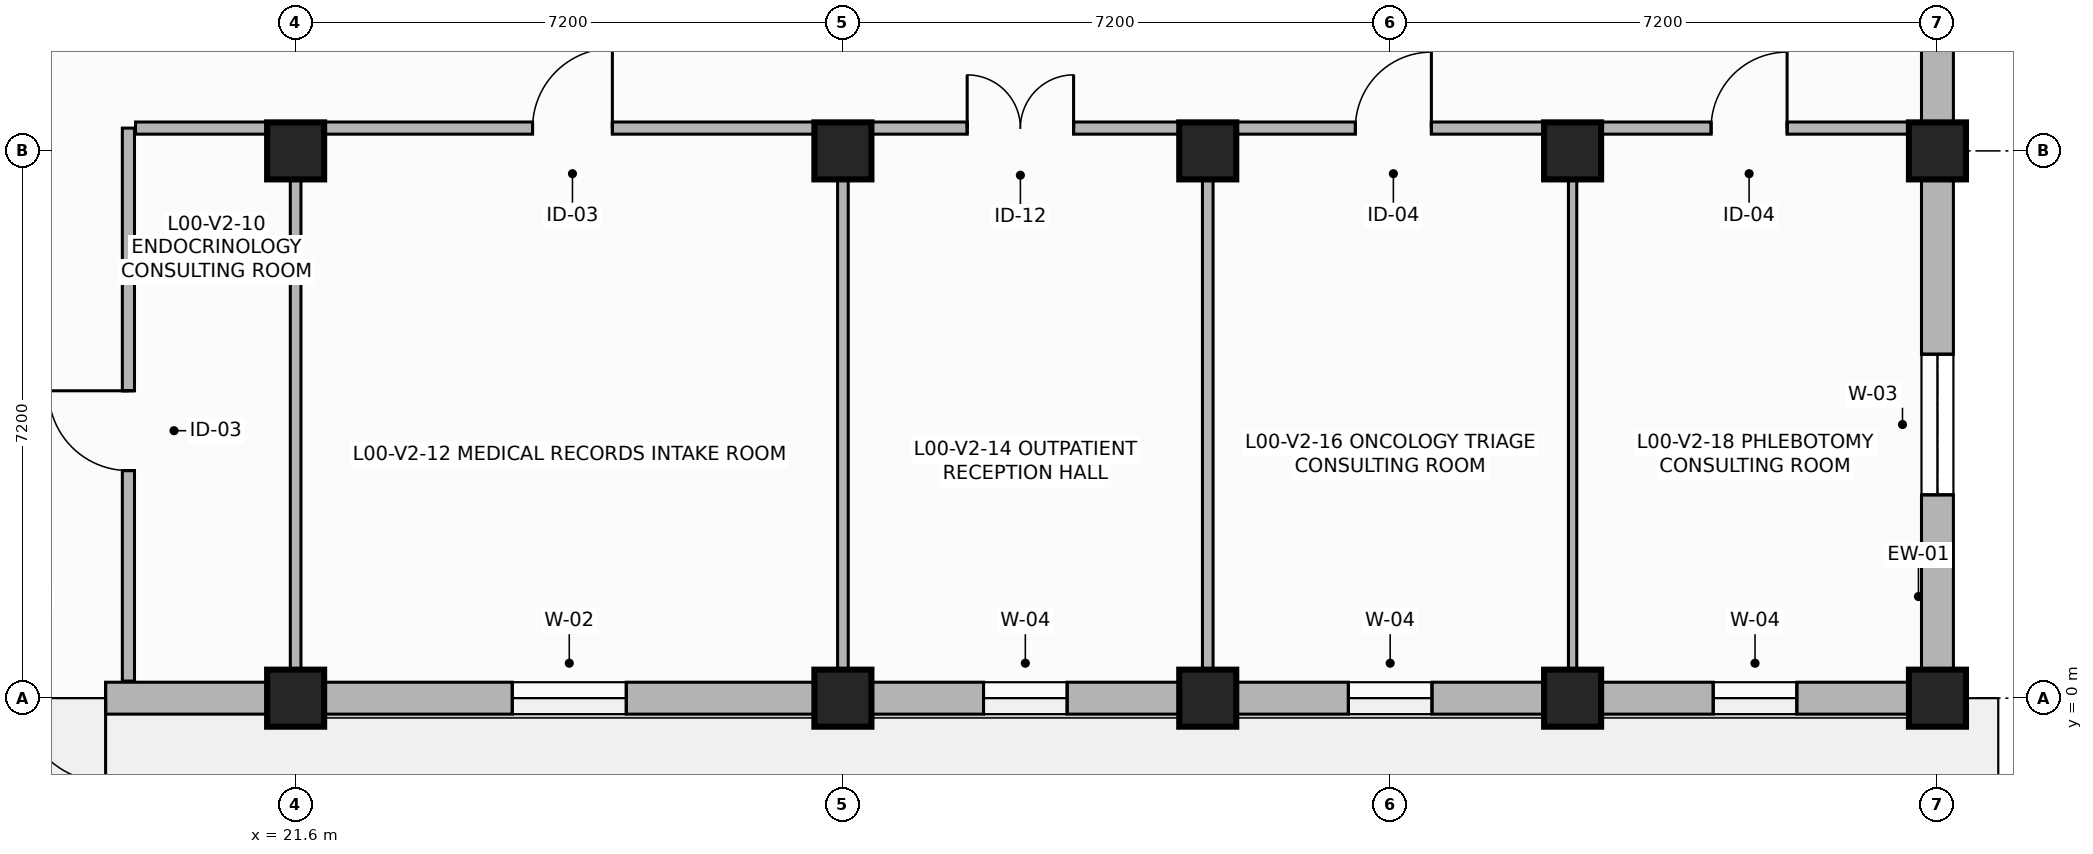
"""IFC4 building model, lengths in metres.
Left out: names, types, materials, properties, quantities, classifications, styles, units other than length and angle.
Written with IfcOpenShell. Run it as: python <this file> out.ifc"""

import sys

from ifc_helpers import new_model, si_unit, direction, frame, frame_2d, origin, origin_2d, place, context, subcontext, project, spatial, rectangle, extrude, element, fill, save


model = new_model("IFC4")
c1 = context("Model", 3, precision=1e-05, world=origin(), true_north=direction((0.0, 1.0)))
c2 = subcontext(c1, "Body", "Model", "MODEL_VIEW")
j1 = project(units=[si_unit("LENGTHUNIT", "METRE"), si_unit("PLANEANGLEUNIT", "RADIAN")], contexts=[c1])
p1 = place(None, origin())
s1 = spatial("IfcSite", under=j1, at=p1, CompositionType="ELEMENT")
p2 = place(p1, origin())
s2 = spatial("IfcBuilding", under=s1, at=p2, CompositionType="ELEMENT")
p3 = place(p2, origin())
s3 = spatial("IfcBuildingStorey", under=s2, at=p3, CompositionType="ELEMENT", Elevation=0.0)
for number, where, z_axis, x_axis in (
    (1, (21.6, 0.0, 0.0), (0.0, 0.0, 1.0), (1.0, 0.0, 0.0)),
    (2, (21.6, 7.2, 0.0), (0.0, 0.0, 1.0), (1.0, 0.0, 0.0)),
    (3, (28.8, 0.0, 0.0), (0.0, 0.0, 1.0), (1.0, 0.0, 0.0)),
    (4, (28.8, 7.2, 0.0), (0.0, 0.0, 1.0), (1.0, 0.0, 0.0)),
    (5, (33.6, 0.0, 0.0), (0.0, 0.0, 1.0), (1.0, 0.0, 0.0)),
    (6, (33.6, 7.2, 0.0), (0.0, 0.0, 1.0), (1.0, 0.0, 0.0)),
    (7, (38.4, 0.0, 0.0), (0.0, 0.0, 1.0), (1.0, 0.0, 0.0)),
    (8, (38.4, 7.2, 0.0), (0.0, 0.0, 1.0), (1.0, 0.0, 0.0)),
    (9, (43.2, 0.0, 0.0), (0.0, 0.0, 1.0), (1.0, 0.0, 0.0)),
    (10, (43.2, 7.2, 0.0), (0.0, 0.0, 1.0), (1.0, 0.0, 0.0)),
):
    element("IfcColumn", number, at=place(p3, frame(where, z_axis=z_axis, x_axis=x_axis)), inside=s3, PredefinedType="COLUMN", context=c2, shape_type="SweptSolid", body=[
        extrude(rectangle(XDim=0.75, YDim=0.75, at=origin_2d()), origin(), (0.0, 0.0, 1.0), 4.22),
    ])
p4 = place(p3, frame((14.4, 0.0, 0.0), z_axis=(0.0, 0.0, 1.0), x_axis=(1.0, 0.0, 0.0)))
e11 = element("IfcWall", 11, at=p4, inside=s3, PredefinedType="SOLIDWALL", context=c2, shape_type="SweptSolid", body=[
    extrude(rectangle(XDim=7.2, YDim=0.42, at=frame_2d((3.6, 0.0))), origin(), (0.0, 0.0, 1.0), 3.6),
])
p5 = place(p4, frame((2.5, 0.0, 0.0)))
e12 = element("IfcOpeningElement", 12, at=p5, cuts=e11, PredefinedType="OPENING", context=c2, shape_type="SweptSolid", body=[
    extrude(rectangle(XDim=2.2, YDim=2.6, at=frame_2d((1.1, 1.3))), frame((0.0, 0.22, 0.0), z_axis=(0.0, -1.0, 0.0), x_axis=(1.0, 0.0, 0.0)), (0.0, 0.0, 1.0), 0.44),
])
p6 = place(p3, frame((21.6, 0.0, 0.0), z_axis=(0.0, 0.0, 1.0), x_axis=(1.0, 0.0, 0.0)))
e13 = element("IfcWall", 13, at=p6, inside=s3, PredefinedType="SOLIDWALL", context=c2, shape_type="SweptSolid", body=[
    extrude(rectangle(XDim=7.2, YDim=0.42, at=frame_2d((3.6, 0.0))), origin(), (0.0, 0.0, 1.0), 3.6),
])
p7 = place(p6, frame((2.85, 0.0, 0.85)))
e14 = element("IfcOpeningElement", 14, at=p7, cuts=e13, PredefinedType="OPENING", context=c2, shape_type="SweptSolid", body=[
    extrude(rectangle(XDim=1.5, YDim=2.5, at=frame_2d((0.75, 1.25))), frame((0.0, 0.22, 0.0), z_axis=(0.0, -1.0, 0.0), x_axis=(1.0, 0.0, 0.0)), (0.0, 0.0, 1.0), 0.44),
])
p8 = place(p3, frame((28.8, 0.0, 0.0), z_axis=(0.0, 0.0, 1.0), x_axis=(1.0, 0.0, 0.0)))
e15 = element("IfcWall", 15, at=p8, inside=s3, PredefinedType="SOLIDWALL", context=c2, shape_type="SweptSolid", body=[
    extrude(rectangle(XDim=4.8, YDim=0.42, at=frame_2d((2.4, 0.0))), origin(), (0.0, 0.0, 1.0), 3.6),
])
p9 = place(p8, frame((1.85, 0.0, 0.85)))
e16 = element("IfcOpeningElement", 16, at=p9, cuts=e15, PredefinedType="OPENING", context=c2, shape_type="SweptSolid", body=[
    extrude(rectangle(XDim=1.1, YDim=2.35, at=frame_2d((0.55, 1.175))), frame((0.0, 0.22, 0.0), z_axis=(0.0, -1.0, 0.0), x_axis=(1.0, 0.0, 0.0)), (0.0, 0.0, 1.0), 0.44),
])
p10 = place(p3, frame((33.6, 0.0, 0.0), z_axis=(0.0, 0.0, 1.0), x_axis=(1.0, 0.0, 0.0)))
e17 = element("IfcWall", 17, at=p10, inside=s3, PredefinedType="SOLIDWALL", context=c2, shape_type="SweptSolid", body=[
    extrude(rectangle(XDim=4.8, YDim=0.42, at=frame_2d((2.4, 0.0))), origin(), (0.0, 0.0, 1.0), 3.6),
])
p11 = place(p10, frame((1.85, 0.0, 0.85)))
e18 = element("IfcOpeningElement", 18, at=p11, cuts=e17, PredefinedType="OPENING", context=c2, shape_type="SweptSolid", body=[
    extrude(rectangle(XDim=1.1, YDim=2.35, at=frame_2d((0.55, 1.175))), frame((0.0, 0.22, 0.0), z_axis=(0.0, -1.0, 0.0), x_axis=(1.0, 0.0, 0.0)), (0.0, 0.0, 1.0), 0.44),
])
p12 = place(p3, frame((38.4, 0.0, 0.0), z_axis=(0.0, 0.0, 1.0), x_axis=(1.0, 0.0, 0.0)))
e19 = element("IfcWall", 19, at=p12, inside=s3, PredefinedType="SOLIDWALL", context=c2, shape_type="SweptSolid", body=[
    extrude(rectangle(XDim=4.8, YDim=0.42, at=frame_2d((2.4, 0.0))), origin(), (0.0, 0.0, 1.0), 3.6),
])
p13 = place(p12, frame((1.85, 0.0, 0.85)))
e20 = element("IfcOpeningElement", 20, at=p13, cuts=e19, PredefinedType="OPENING", context=c2, shape_type="SweptSolid", body=[
    extrude(rectangle(XDim=1.1, YDim=2.35, at=frame_2d((0.55, 1.175))), frame((0.0, 0.22, 0.0), z_axis=(0.0, -1.0, 0.0), x_axis=(1.0, 0.0, 0.0)), (0.0, 0.0, 1.0), 0.44),
])
p14 = place(p3, frame((43.2, 0.0, 0.0), z_axis=(0.0, 0.0, 1.0), x_axis=(0.0, 1.0, 0.0)))
e21 = element("IfcWall", 21, at=p14, inside=s3, PredefinedType="SOLIDWALL", context=c2, shape_type="SweptSolid", body=[
    extrude(rectangle(XDim=7.2, YDim=0.42, at=frame_2d((3.6, 0.0))), origin(), (0.0, 0.0, 1.0), 3.6),
])
p15 = place(p14, frame((2.675, 0.0, 0.85)))
e22 = element("IfcOpeningElement", 22, at=p15, cuts=e21, PredefinedType="OPENING", context=c2, shape_type="SweptSolid", body=[
    extrude(rectangle(XDim=1.85, YDim=2.4, at=frame_2d((0.925, 1.2))), frame((0.0, 0.22, 0.0), z_axis=(0.0, -1.0, 0.0), x_axis=(1.0, 0.0, 0.0)), (0.0, 0.0, 1.0), 0.44),
])
p16 = place(p3, frame((43.2, 7.2, 0.0), z_axis=(0.0, 0.0, 1.0), x_axis=(0.0, 1.0, 0.0)))
e23 = element("IfcWall", 23, at=p16, inside=s3, PredefinedType="SOLIDWALL", context=c2, shape_type="SweptSolid", body=[
    extrude(rectangle(XDim=7.2, YDim=0.42, at=frame_2d((3.6, 0.0))), origin(), (0.0, 0.0, 1.0), 3.6),
])
p17 = place(p16, frame((4.175, 0.0, 0.85)))
e24 = element("IfcOpeningElement", 24, at=p17, cuts=e23, PredefinedType="OPENING", context=c2, shape_type="SweptSolid", body=[
    extrude(rectangle(XDim=1.85, YDim=2.4, at=frame_2d((0.925, 1.2))), frame((0.0, 0.22, 0.0), z_axis=(0.0, -1.0, 0.0), x_axis=(1.0, 0.0, 0.0)), (0.0, 0.0, 1.0), 0.44),
])
p18 = place(p3, frame((21.6, 7.5, 0.0), z_axis=(0.0, 0.0, 1.0), x_axis=(0.0, -1.0, 0.0)))
e25 = element("IfcWall", 25, at=p18, inside=s3, PredefinedType="PARTITIONING", context=c2, shape_type="SweptSolid", body=[
    extrude(rectangle(XDim=7.275, YDim=0.14, at=frame_2d((3.637, 0.0))), origin(), (0.0, 0.0, 1.0), 3.58),
])
p19 = place(p3, frame((19.4, 0.225, 0.0), z_axis=(0.0, 0.0, 1.0), x_axis=(0.0, 1.0, 0.0)))
e26 = element("IfcWall", 26, at=p19, inside=s3, PredefinedType="PARTITIONING", context=c2, shape_type="SweptSolid", body=[
    extrude(rectangle(XDim=7.275, YDim=0.16, at=frame_2d((3.637, 0.0))), origin(), (0.0, 0.0, 1.0), 3.58),
])
p20 = place(p19, frame((2.769, 0.0, 0.0)))
e27 = element("IfcOpeningElement", 27, at=p20, cuts=e26, PredefinedType="OPENING", context=c2, shape_type="SweptSolid", body=[
    extrude(rectangle(XDim=1.05, YDim=2.15, at=frame_2d((0.525, 1.075))), frame((0.0, 0.09, 0.0), z_axis=(0.0, -1.0, 0.0), x_axis=(1.0, 0.0, 0.0)), (0.0, 0.0, 1.0), 0.18),
])
p21 = place(p3, frame((19.494, 7.5, 0.0), z_axis=(0.0, 0.0, 1.0), x_axis=(1.0, 0.0, 0.0)))
e28 = element("IfcWall", 28, at=p21, inside=s3, PredefinedType="PARTITIONING", context=c2, shape_type="SweptSolid", body=[
    extrude(rectangle(XDim=2.022, YDim=0.16, at=frame_2d((1.011, 0.0))), origin(), (0.0, 0.0, 1.0), 3.58),
])
p22 = place(p3, frame((21.684, 7.5, 0.0), z_axis=(0.0, 0.0, 1.0), x_axis=(1.0, 0.0, 0.0)))
e29 = element("IfcWall", 29, at=p22, inside=s3, PredefinedType="PARTITIONING", context=c2, shape_type="SweptSolid", body=[
    extrude(rectangle(XDim=7.116, YDim=0.16, at=frame_2d((3.558, 0.0))), origin(), (0.0, 0.0, 1.0), 3.58),
])
p23 = place(p22, frame((3.033, 0.0, 0.0)))
e30 = element("IfcOpeningElement", 30, at=p23, cuts=e29, PredefinedType="OPENING", context=c2, shape_type="SweptSolid", body=[
    extrude(rectangle(XDim=1.05, YDim=2.15, at=frame_2d((0.525, 1.075))), frame((0.0, 0.09, 0.0), z_axis=(0.0, -1.0, 0.0), x_axis=(1.0, 0.0, 0.0)), (0.0, 0.0, 1.0), 0.18),
])
p24 = place(p3, frame((28.8, 7.406, 0.0), z_axis=(0.0, 0.0, 1.0), x_axis=(0.0, -1.0, 0.0)))
e31 = element("IfcWall", 31, at=p24, inside=s3, PredefinedType="PARTITIONING", context=c2, shape_type="SweptSolid", body=[
    extrude(rectangle(XDim=7.181, YDim=0.14, at=frame_2d((3.59, 0.0))), origin(), (0.0, 0.0, 1.0), 3.58),
])
p25 = place(p3, frame((28.884, 7.5, 0.0), z_axis=(0.0, 0.0, 1.0), x_axis=(1.0, 0.0, 0.0)))
e32 = element("IfcWall", 32, at=p25, inside=s3, PredefinedType="PARTITIONING", context=c2, shape_type="SweptSolid", body=[
    extrude(rectangle(XDim=4.716, YDim=0.16, at=frame_2d((2.358, 0.0))), origin(), (0.0, 0.0, 1.0), 3.58),
])
p26 = place(p25, frame((1.551, 0.0, 0.0)))
e33 = element("IfcOpeningElement", 33, at=p26, cuts=e32, PredefinedType="OPENING", context=c2, shape_type="SweptSolid", body=[
    extrude(rectangle(XDim=1.4, YDim=2.3, at=frame_2d((0.7, 1.15))), frame((0.0, 0.09, 0.0), z_axis=(0.0, -1.0, 0.0), x_axis=(1.0, 0.0, 0.0)), (0.0, 0.0, 1.0), 0.18),
])
p27 = place(p3, frame((33.6, 7.406, 0.0), z_axis=(0.0, 0.0, 1.0), x_axis=(0.0, -1.0, 0.0)))
e34 = element("IfcWall", 34, at=p27, inside=s3, PredefinedType="PARTITIONING", context=c2, shape_type="SweptSolid", body=[
    extrude(rectangle(XDim=7.181, YDim=0.14, at=frame_2d((3.59, 0.0))), origin(), (0.0, 0.0, 1.0), 3.58),
])
p28 = place(p3, frame((33.684, 7.5, 0.0), z_axis=(0.0, 0.0, 1.0), x_axis=(1.0, 0.0, 0.0)))
e35 = element("IfcWall", 35, at=p28, inside=s3, PredefinedType="PARTITIONING", context=c2, shape_type="SweptSolid", body=[
    extrude(rectangle(XDim=4.716, YDim=0.16, at=frame_2d((2.358, 0.0))), origin(), (0.0, 0.0, 1.0), 3.58),
])
p29 = place(p28, frame((1.858, 0.0, 0.0)))
e36 = element("IfcOpeningElement", 36, at=p29, cuts=e35, PredefinedType="OPENING", context=c2, shape_type="SweptSolid", body=[
    extrude(rectangle(XDim=1.0, YDim=2.15, at=frame_2d((0.5, 1.075))), frame((0.0, 0.09, 0.0), z_axis=(0.0, -1.0, 0.0), x_axis=(1.0, 0.0, 0.0)), (0.0, 0.0, 1.0), 0.18),
])
p30 = place(p3, frame((38.4, 7.406, 0.0), z_axis=(0.0, 0.0, 1.0), x_axis=(0.0, -1.0, 0.0)))
e37 = element("IfcWall", 37, at=p30, inside=s3, PredefinedType="PARTITIONING", context=c2, shape_type="SweptSolid", body=[
    extrude(rectangle(XDim=7.181, YDim=0.11, at=frame_2d((3.59, 0.0))), origin(), (0.0, 0.0, 1.0), 3.58),
])
p31 = place(p3, frame((38.469, 7.5, 0.0), z_axis=(0.0, 0.0, 1.0), x_axis=(1.0, 0.0, 0.0)))
e38 = element("IfcWall", 38, at=p31, inside=s3, PredefinedType="PARTITIONING", context=c2, shape_type="SweptSolid", body=[
    extrude(rectangle(XDim=4.506, YDim=0.16, at=frame_2d((2.253, 0.0))), origin(), (0.0, 0.0, 1.0), 3.58),
])
p32 = place(p31, frame((1.753, 0.0, 0.0)))
e39 = element("IfcOpeningElement", 39, at=p32, cuts=e38, PredefinedType="OPENING", context=c2, shape_type="SweptSolid", body=[
    extrude(rectangle(XDim=1.0, YDim=2.15, at=frame_2d((0.5, 1.075))), frame((0.0, 0.09, 0.0), z_axis=(0.0, -1.0, 0.0), x_axis=(1.0, 0.0, 0.0)), (0.0, 0.0, 1.0), 0.18),
])
p33 = place(p5, frame((2.2, 0.0, 0.0), z_axis=(0.0, 0.0, 1.0), x_axis=(-1.0, 0.0, 0.0)))
e40 = element("IfcDoor", 40, at=p33, inside=s3, OperationType="DOUBLE_DOOR_SINGLE_SWING", PredefinedType="DOOR", context=c2, shape_type="SweptSolid", body=[
    extrude(rectangle(XDim=2.2, YDim=2.6, at=frame_2d((1.1, 1.3))), frame((0.0, 0.025, 0.0), z_axis=(0.0, -1.0, 0.0), x_axis=(1.0, 0.0, 0.0)), (0.0, 0.0, 1.0), 0.05),
])
fill(e12, e40)
p34 = place(p7, origin())
e41 = element("IfcWindow", 41, at=p34, inside=s3, PartitioningType="SINGLE_PANEL", PredefinedType="WINDOW", context=c2, shape_type="SweptSolid", body=[
    extrude(rectangle(XDim=1.5, YDim=2.5, at=frame_2d((0.75, 1.25))), frame((0.0, 0.03, 0.0), z_axis=(0.0, -1.0, 0.0), x_axis=(1.0, 0.0, 0.0)), (0.0, 0.0, 1.0), 0.06),
])
fill(e14, e41)
p35 = place(p9, origin())
e42 = element("IfcWindow", 42, at=p35, inside=s3, PartitioningType="SINGLE_PANEL", PredefinedType="WINDOW", context=c2, shape_type="SweptSolid", body=[
    extrude(rectangle(XDim=1.1, YDim=2.35, at=frame_2d((0.55, 1.175))), frame((0.0, 0.03, 0.0), z_axis=(0.0, -1.0, 0.0), x_axis=(1.0, 0.0, 0.0)), (0.0, 0.0, 1.0), 0.06),
])
fill(e16, e42)
p36 = place(p11, origin())
e43 = element("IfcWindow", 43, at=p36, inside=s3, PartitioningType="SINGLE_PANEL", PredefinedType="WINDOW", context=c2, shape_type="SweptSolid", body=[
    extrude(rectangle(XDim=1.1, YDim=2.35, at=frame_2d((0.55, 1.175))), frame((0.0, 0.03, 0.0), z_axis=(0.0, -1.0, 0.0), x_axis=(1.0, 0.0, 0.0)), (0.0, 0.0, 1.0), 0.06),
])
fill(e18, e43)
p37 = place(p13, origin())
e44 = element("IfcWindow", 44, at=p37, inside=s3, PartitioningType="SINGLE_PANEL", PredefinedType="WINDOW", context=c2, shape_type="SweptSolid", body=[
    extrude(rectangle(XDim=1.1, YDim=2.35, at=frame_2d((0.55, 1.175))), frame((0.0, 0.03, 0.0), z_axis=(0.0, -1.0, 0.0), x_axis=(1.0, 0.0, 0.0)), (0.0, 0.0, 1.0), 0.06),
])
fill(e20, e44)
p38 = place(p15, origin())
e45 = element("IfcWindow", 45, at=p38, inside=s3, PartitioningType="SINGLE_PANEL", PredefinedType="WINDOW", context=c2, shape_type="SweptSolid", body=[
    extrude(rectangle(XDim=1.85, YDim=2.4, at=frame_2d((0.925, 1.2))), frame((0.0, 0.03, 0.0), z_axis=(0.0, -1.0, 0.0), x_axis=(1.0, 0.0, 0.0)), (0.0, 0.0, 1.0), 0.06),
])
fill(e22, e45)
p39 = place(p20, origin())
e46 = element("IfcDoor", 46, at=p39, inside=s3, OperationType="SINGLE_SWING_RIGHT", PredefinedType="DOOR", context=c2, shape_type="SweptSolid", body=[
    extrude(rectangle(XDim=1.05, YDim=2.15, at=frame_2d((0.525, 1.075))), frame((0.0, 0.025, 0.0), z_axis=(0.0, -1.0, 0.0), x_axis=(1.0, 0.0, 0.0)), (0.0, 0.0, 1.0), 0.05),
])
fill(e27, e46)
p40 = place(p23, origin())
e47 = element("IfcDoor", 47, at=p40, inside=s3, OperationType="SINGLE_SWING_RIGHT", PredefinedType="DOOR", context=c2, shape_type="SweptSolid", body=[
    extrude(rectangle(XDim=1.05, YDim=2.15, at=frame_2d((0.525, 1.075))), frame((0.0, 0.025, 0.0), z_axis=(0.0, -1.0, 0.0), x_axis=(1.0, 0.0, 0.0)), (0.0, 0.0, 1.0), 0.05),
])
fill(e30, e47)
p41 = place(p26, origin())
e48 = element("IfcDoor", 48, at=p41, inside=s3, OperationType="DOUBLE_DOOR_SINGLE_SWING", PredefinedType="DOOR", context=c2, shape_type="SweptSolid", body=[
    extrude(rectangle(XDim=1.4, YDim=2.3, at=frame_2d((0.7, 1.15))), frame((0.0, 0.025, 0.0), z_axis=(0.0, -1.0, 0.0), x_axis=(1.0, 0.0, 0.0)), (0.0, 0.0, 1.0), 0.05),
])
fill(e33, e48)
p42 = place(p29, origin())
e49 = element("IfcDoor", 49, at=p42, inside=s3, OperationType="SINGLE_SWING_RIGHT", PredefinedType="DOOR", context=c2, shape_type="SweptSolid", body=[
    extrude(rectangle(XDim=1.0, YDim=2.15, at=frame_2d((0.5, 1.075))), frame((0.0, 0.025, 0.0), z_axis=(0.0, -1.0, 0.0), x_axis=(1.0, 0.0, 0.0)), (0.0, 0.0, 1.0), 0.05),
])
fill(e36, e49)
p43 = place(p32, origin())
e50 = element("IfcDoor", 50, at=p43, inside=s3, OperationType="SINGLE_SWING_RIGHT", PredefinedType="DOOR", context=c2, shape_type="SweptSolid", body=[
    extrude(rectangle(XDim=1.0, YDim=2.15, at=frame_2d((0.5, 1.075))), frame((0.0, 0.025, 0.0), z_axis=(0.0, -1.0, 0.0), x_axis=(1.0, 0.0, 0.0)), (0.0, 0.0, 1.0), 0.05),
])
fill(e39, e50)
save(model, sys.argv[1])
